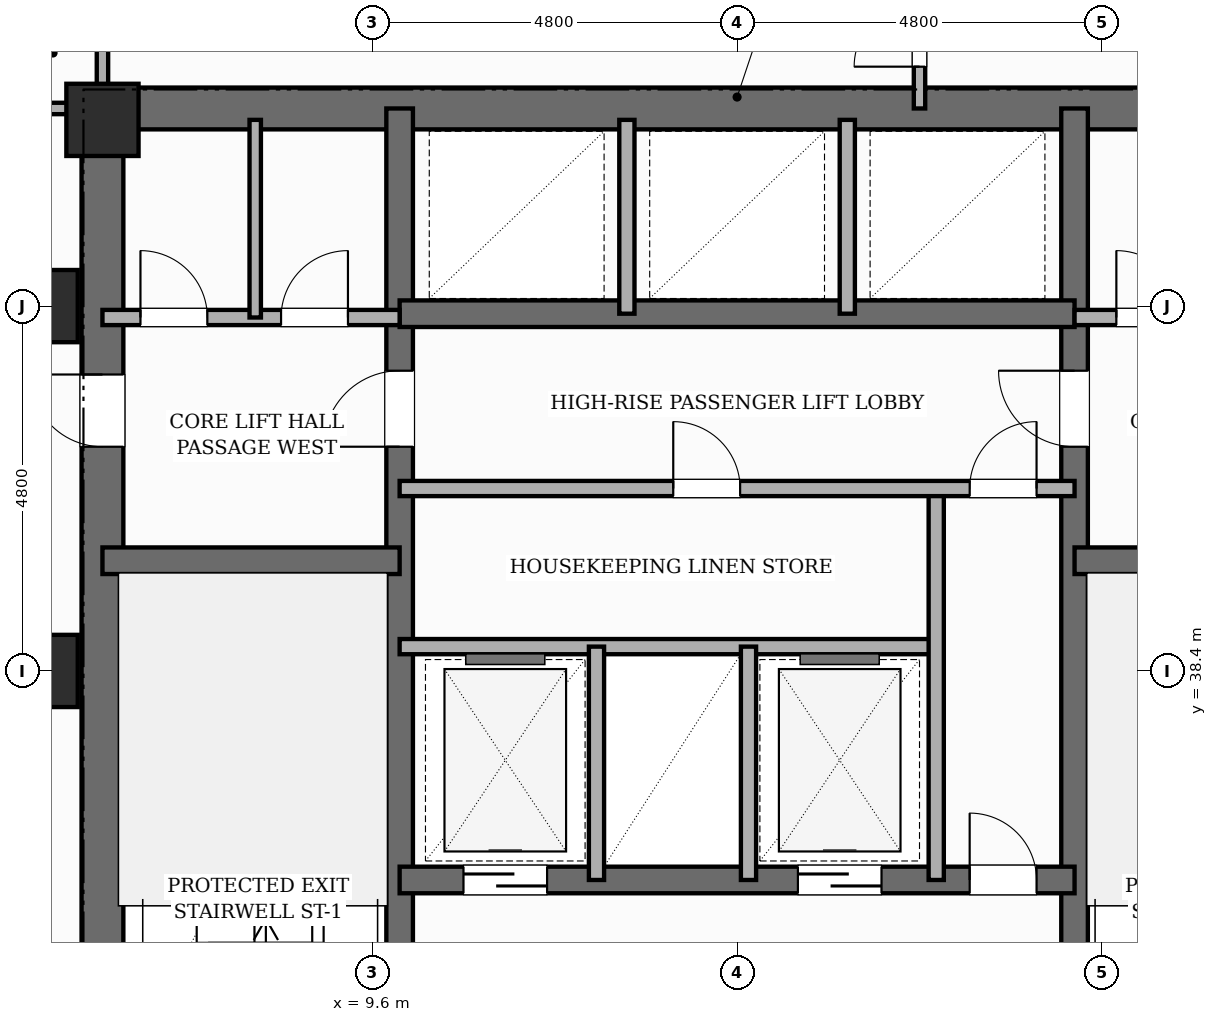
"""IFC4 building model, lengths in metres.
Left out: names, types, materials, properties, quantities, classifications, styles, units other than length and angle.
Written with IfcOpenShell. Run it as: python <this file> out.ifc"""

import sys

from ifc_helpers import new_model, si_unit, direction, frame, frame_2d, origin, origin_2d, place, context, subcontext, project, spatial, rectangle, extrude, element, fill, save


model = new_model("IFC4")
c1 = context("Model", 3, precision=1e-05, world=origin(), true_north=direction((0.0, 1.0)))
c2 = subcontext(c1, "Body", "Model", "MODEL_VIEW")
j1 = project(units=[si_unit("LENGTHUNIT", "METRE"), si_unit("PLANEANGLEUNIT", "RADIAN")], contexts=[c1])
p1 = place(None, origin())
s1 = spatial("IfcSite", under=j1, at=p1, CompositionType="ELEMENT")
p2 = place(p1, origin())
s2 = spatial("IfcBuilding", under=s1, at=p2, CompositionType="ELEMENT")
p3 = place(p2, frame((0.0, 0.0, 107.2)))
s3 = spatial("IfcBuildingStorey", under=s2, at=p3, CompositionType="ELEMENT", Elevation=107.2)
p4 = place(p3, frame((6.05, 30.625, 0.0), z_axis=(0.0, 0.0, 1.0), x_axis=(0.0, 1.0, 0.0)))
e1 = element("IfcWall", 1, at=p4, inside=s3, PredefinedType="SHEAR", context=c2, shape_type="SweptSolid", body=[
    extrude(rectangle(XDim=15.45, YDim=0.55, at=frame_2d((7.725, 0.0))), origin(), (0.0, 0.0, 1.0), 3.6),
])
p5 = place(p4, frame((10.725, 0.0, 0.0)))
e2 = element("IfcOpeningElement", 2, at=p5, cuts=e1, PredefinedType="OPENING", context=c2, shape_type="SweptSolid", body=[
    extrude(rectangle(XDim=0.95, YDim=2.15, at=frame_2d((0.475, 1.075))), frame((0.0, 0.285, 0.0), z_axis=(0.0, -1.0, 0.0), x_axis=(1.0, 0.0, 0.0)), (0.0, 0.0, 1.0), 0.57),
])
p6 = place(p3, frame((6.05, 45.8, 0.0), z_axis=(0.0, 0.0, 1.0), x_axis=(1.0, 0.0, 0.0)))
e3 = element("IfcWall", 3, at=p6, inside=s3, PredefinedType="SHEAR", context=c2, shape_type="SweptSolid", body=[
    extrude(rectangle(XDim=16.7, YDim=0.55, at=frame_2d((8.35, 0.0))), origin(), (0.0, 0.0, 1.0), 3.6),
])
p7 = place(p3, frame((9.96, 30.9, 0.0), z_axis=(0.0, 0.0, 1.0), x_axis=(0.0, 1.0, 0.0)))
e4 = element("IfcWall", 4, at=p7, inside=s3, PredefinedType="SHEAR", context=c2, shape_type="SweptSolid", body=[
    extrude(rectangle(XDim=14.9, YDim=0.35, at=frame_2d((7.45, 0.0))), origin(), (0.0, 0.0, 1.0), 3.6),
])
p8 = place(p7, frame((0.65, 0.0, 0.0)))
e5 = element("IfcOpeningElement", 5, at=p8, cuts=e4, PredefinedType="OPENING", context=c2, shape_type="SweptSolid", body=[
    extrude(rectangle(XDim=0.95, YDim=2.1, at=frame_2d((0.475, 1.05))), frame((0.0, 0.185, 0.0), z_axis=(0.0, -1.0, 0.0), x_axis=(1.0, 0.0, 0.0)), (0.0, 0.0, 1.0), 0.37),
])
p9 = place(p7, frame((10.45, 0.0, 0.0)))
e6 = element("IfcOpeningElement", 6, at=p9, cuts=e4, PredefinedType="OPENING", context=c2, shape_type="SweptSolid", body=[
    extrude(rectangle(XDim=1.0, YDim=2.15, at=frame_2d((0.5, 1.075))), frame((0.0, 0.185, 0.0), z_axis=(0.0, -1.0, 0.0), x_axis=(1.0, 0.0, 0.0)), (0.0, 0.0, 1.0), 0.37),
])
p10 = place(p3, frame((18.84, 30.9, 0.0), z_axis=(0.0, 0.0, 1.0), x_axis=(0.0, 1.0, 0.0)))
e7 = element("IfcWall", 7, at=p10, inside=s3, PredefinedType="SHEAR", context=c2, shape_type="SweptSolid", body=[
    extrude(rectangle(XDim=14.9, YDim=0.35, at=frame_2d((7.45, 0.0))), origin(), (0.0, 0.0, 1.0), 3.6),
])
p11 = place(p10, frame((0.65, 0.0, 0.0)))
e8 = element("IfcOpeningElement", 8, at=p11, cuts=e7, PredefinedType="OPENING", context=c2, shape_type="SweptSolid", body=[
    extrude(rectangle(XDim=0.95, YDim=2.1, at=frame_2d((0.475, 1.05))), frame((0.0, 0.185, 0.0), z_axis=(0.0, -1.0, 0.0), x_axis=(1.0, 0.0, 0.0)), (0.0, 0.0, 1.0), 0.37),
])
p12 = place(p10, frame((10.45, 0.0, 0.0)))
e9 = element("IfcOpeningElement", 9, at=p12, cuts=e7, PredefinedType="OPENING", context=c2, shape_type="SweptSolid", body=[
    extrude(rectangle(XDim=1.0, YDim=2.15, at=frame_2d((0.5, 1.075))), frame((0.0, 0.185, 0.0), z_axis=(0.0, -1.0, 0.0), x_axis=(1.0, 0.0, 0.0)), (0.0, 0.0, 1.0), 0.37),
])
for number, where, z_axis, x_axis in (
    (10, (6.05, 39.85, 0.0), (0.0, 0.0, 1.0), (1.0, 0.0, 0.0)),
    (11, (18.84, 39.85, 0.0), (0.0, 0.0, 1.0), (1.0, 0.0, 0.0)),
):
    element("IfcWall", number, at=place(p3, frame(where, z_axis=z_axis, x_axis=x_axis)), inside=s3, PredefinedType="SHEAR", context=c2, shape_type="SweptSolid", body=[
        extrude(rectangle(XDim=3.91, YDim=0.35, at=frame_2d((1.955, 0.0))), origin(), (0.0, 0.0, 1.0), 3.6),
    ])
p13 = place(p3, frame((9.96, 35.65, 0.0), z_axis=(0.0, 0.0, 1.0), x_axis=(1.0, 0.0, 0.0)))
e12 = element("IfcWall", 12, at=p13, inside=s3, PredefinedType="SHEAR", context=c2, shape_type="SweptSolid", body=[
    extrude(rectangle(XDim=8.88, YDim=0.35, at=frame_2d((4.44, 0.0))), origin(), (0.0, 0.0, 1.0), 3.6),
])
p14 = place(p13, frame((0.84, 0.0, 0.0)))
e13 = element("IfcOpeningElement", 13, at=p14, cuts=e12, PredefinedType="OPENING", context=c2, shape_type="SweptSolid", body=[
    extrude(rectangle(XDim=1.1, YDim=2.15, at=frame_2d((0.55, 1.075))), frame((0.0, 0.185, 0.0), z_axis=(0.0, -1.0, 0.0), x_axis=(1.0, 0.0, 0.0)), (0.0, 0.0, 1.0), 0.37),
])
p15 = place(p13, frame((5.24, 0.0, 0.0)))
e14 = element("IfcOpeningElement", 14, at=p15, cuts=e12, PredefinedType="OPENING", context=c2, shape_type="SweptSolid", body=[
    extrude(rectangle(XDim=1.1, YDim=2.15, at=frame_2d((0.55, 1.075))), frame((0.0, 0.185, 0.0), z_axis=(0.0, -1.0, 0.0), x_axis=(1.0, 0.0, 0.0)), (0.0, 0.0, 1.0), 0.37),
])
p16 = place(p13, frame((7.5, 0.0, 0.0)))
e15 = element("IfcOpeningElement", 15, at=p16, cuts=e12, PredefinedType="OPENING", context=c2, shape_type="SweptSolid", body=[
    extrude(rectangle(XDim=0.88, YDim=2.1, at=frame_2d((0.44, 1.05))), frame((0.0, 0.185, 0.0), z_axis=(0.0, -1.0, 0.0), x_axis=(1.0, 0.0, 0.0)), (0.0, 0.0, 1.0), 0.37),
])
p17 = place(p3, frame((9.96, 43.1, 0.0), z_axis=(0.0, 0.0, 1.0), x_axis=(1.0, 0.0, 0.0)))
e16 = element("IfcWall", 16, at=p17, inside=s3, PredefinedType="SHEAR", context=c2, shape_type="SweptSolid", body=[
    extrude(rectangle(XDim=8.88, YDim=0.35, at=frame_2d((4.44, 0.0))), origin(), (0.0, 0.0, 1.0), 3.6),
])
for number, where, z_axis, x_axis in (
    (17, (5.25, 38.4, 0.0), (0.0, 0.0, 1.0), (1.0, 0.0, 0.0)),
    (18, (5.25, 43.2, 0.0), (0.0, 0.0, 1.0), (1.0, 0.0, 0.0)),
    (19, (6.05, 45.65, 0.0), (0.0, 0.0, 1.0), (1.0, 0.0, 0.0)),
):
    element("IfcColumn", number, at=place(p3, frame(where, z_axis=z_axis, x_axis=x_axis)), inside=s3, PredefinedType="COLUMN", context=c2, shape_type="SweptSolid", body=[
        extrude(rectangle(XDim=0.95, YDim=0.95, at=origin_2d()), origin(), (0.0, 0.0, 1.0), 3.6),
    ])
p18 = place(p3, frame((5.03, 46.16, 0.0), z_axis=(0.0, 0.0, 1.0), x_axis=(0.382650053678, 0.92389335771, 0.0)))
e20 = element("IfcWall", 20, at=p18, inside=s3, PredefinedType="STANDARD", context=c2, shape_type="SweptSolid", body=[
    extrude(rectangle(XDim=0.626, YDim=0.32, at=frame_2d((0.313, 0.0))), origin(), (0.0, 0.0, 1.0), 3.36),
])
p19 = place(p3, frame((9.96, 38.72, 0.0), z_axis=(0.0, 0.0, 1.0), x_axis=(1.0, 0.0, 0.0)))
e21 = element("IfcWall", 21, at=p19, inside=s3, PredefinedType="POLYGONAL", context=c2, shape_type="SweptSolid", body=[
    extrude(rectangle(XDim=7.06, YDim=0.2, at=frame_2d((3.53, 0.0))), origin(), (0.0, 0.0, 1.0), 3.36),
])
for number, where, z_axis, x_axis in (
    (22, (12.55, 35.65, 0.0), (0.0, 0.0, 1.0), (0.0, 1.0, 0.0)),
    (23, (14.55, 35.65, 0.0), (0.0, 0.0, 1.0), (0.0, 1.0, 0.0)),
):
    element("IfcWall", number, at=place(p3, frame(where, z_axis=z_axis, x_axis=x_axis)), inside=s3, PredefinedType="POLYGONAL", context=c2, shape_type="SweptSolid", body=[
        extrude(rectangle(XDim=3.07, YDim=0.2, at=frame_2d((1.535, 0.0))), origin(), (0.0, 0.0, 1.0), 3.36),
    ])
p20 = place(p3, frame((17.02, 35.65, 0.0), z_axis=(0.0, 0.0, 1.0), x_axis=(0.0, 1.0, 0.0)))
e24 = element("IfcWall", 24, at=p20, inside=s3, PredefinedType="POLYGONAL", context=c2, shape_type="SweptSolid", body=[
    extrude(rectangle(XDim=5.15, YDim=0.2, at=frame_2d((2.575, 0.0))), origin(), (0.0, 0.0, 1.0), 3.36),
])
p21 = place(p3, frame((9.96, 40.8, 0.0), z_axis=(0.0, 0.0, 1.0), x_axis=(1.0, 0.0, 0.0)))
e25 = element("IfcWall", 25, at=p21, inside=s3, PredefinedType="POLYGONAL", context=c2, shape_type="SweptSolid", body=[
    extrude(rectangle(XDim=8.88, YDim=0.2, at=frame_2d((4.44, 0.0))), origin(), (0.0, 0.0, 1.0), 3.36),
])
p22 = place(p21, frame((7.5, 0.0, 0.0)))
e26 = element("IfcOpeningElement", 26, at=p22, cuts=e25, PredefinedType="OPENING", context=c2, shape_type="SweptSolid", body=[
    extrude(rectangle(XDim=0.88, YDim=2.1, at=frame_2d((0.44, 1.05))), frame((0.0, 0.11, 0.0), z_axis=(0.0, -1.0, 0.0), x_axis=(1.0, 0.0, 0.0)), (0.0, 0.0, 1.0), 0.22),
])
p23 = place(p21, frame((3.6, 0.0, 0.0)))
e27 = element("IfcOpeningElement", 27, at=p23, cuts=e25, PredefinedType="OPENING", context=c2, shape_type="SweptSolid", body=[
    extrude(rectangle(XDim=0.88, YDim=2.1, at=frame_2d((0.44, 1.05))), frame((0.0, 0.11, 0.0), z_axis=(0.0, -1.0, 0.0), x_axis=(1.0, 0.0, 0.0)), (0.0, 0.0, 1.0), 0.22),
])
p24 = place(p3, frame((18.84, 43.05, 0.0), z_axis=(0.0, 0.0, 1.0), x_axis=(1.0, 0.0, 0.0)))
e28 = element("IfcWall", 28, at=p24, inside=s3, PredefinedType="POLYGONAL", context=c2, shape_type="SweptSolid", body=[
    extrude(rectangle(XDim=3.91, YDim=0.2, at=frame_2d((1.955, 0.0))), origin(), (0.0, 0.0, 1.0), 2.54),
])
p25 = place(p24, frame((0.55, 0.0, 0.0)))
e29 = element("IfcOpeningElement", 29, at=p25, cuts=e28, PredefinedType="OPENING", context=c2, shape_type="SweptSolid", body=[
    extrude(rectangle(XDim=0.88, YDim=2.1, at=frame_2d((0.44, 1.05))), frame((0.0, 0.11, 0.0), z_axis=(0.0, -1.0, 0.0), x_axis=(1.0, 0.0, 0.0)), (0.0, 0.0, 1.0), 0.22),
])
p26 = place(p24, frame((2.25, 0.0, 0.0)))
e30 = element("IfcOpeningElement", 30, at=p26, cuts=e28, PredefinedType="OPENING", context=c2, shape_type="SweptSolid", body=[
    extrude(rectangle(XDim=0.86, YDim=2.1, at=frame_2d((0.43, 1.05))), frame((0.0, 0.11, 0.0), z_axis=(0.0, -1.0, 0.0), x_axis=(1.0, 0.0, 0.0)), (0.0, 0.0, 1.0), 0.22),
])
p27 = place(p3, frame((6.05, 43.05, 0.0), z_axis=(0.0, 0.0, 1.0), x_axis=(1.0, 0.0, 0.0)))
e31 = element("IfcWall", 31, at=p27, inside=s3, PredefinedType="POLYGONAL", context=c2, shape_type="SweptSolid", body=[
    extrude(rectangle(XDim=3.91, YDim=0.2, at=frame_2d((1.955, 0.0))), origin(), (0.0, 0.0, 1.0), 2.54),
])
p28 = place(p27, frame((0.5, 0.0, 0.0)))
e32 = element("IfcOpeningElement", 32, at=p28, cuts=e31, PredefinedType="OPENING", context=c2, shape_type="SweptSolid", body=[
    extrude(rectangle(XDim=0.88, YDim=2.1, at=frame_2d((0.44, 1.05))), frame((0.0, 0.11, 0.0), z_axis=(0.0, -1.0, 0.0), x_axis=(1.0, 0.0, 0.0)), (0.0, 0.0, 1.0), 0.22),
])
p29 = place(p27, frame((2.35, 0.0, 0.0)))
e33 = element("IfcOpeningElement", 33, at=p29, cuts=e31, PredefinedType="OPENING", context=c2, shape_type="SweptSolid", body=[
    extrude(rectangle(XDim=0.88, YDim=2.1, at=frame_2d((0.44, 1.05))), frame((0.0, 0.11, 0.0), z_axis=(0.0, -1.0, 0.0), x_axis=(1.0, 0.0, 0.0)), (0.0, 0.0, 1.0), 0.22),
])
for number, where, z_axis, x_axis in (
    (34, (12.95, 43.1, 0.0), (0.0, 0.0, 1.0), (0.0, 1.0, 0.0)),
    (35, (15.85, 43.1, 0.0), (0.0, 0.0, 1.0), (0.0, 1.0, 0.0)),
):
    element("IfcWall", number, at=place(p3, frame(where, z_axis=z_axis, x_axis=x_axis)), inside=s3, PredefinedType="POLYGONAL", context=c2, shape_type="SweptSolid", body=[
        extrude(rectangle(XDim=2.55, YDim=0.2, at=frame_2d((1.275, 0.0))), origin(), (0.0, 0.0, 1.0), 3.36),
    ])
p30 = place(p3, frame((8.06, 43.05, 0.0), z_axis=(0.0, 0.0, 1.0), x_axis=(0.0, 1.0, 0.0)))
e36 = element("IfcWall", 36, at=p30, inside=s3, PredefinedType="PARTITIONING", context=c2, shape_type="SweptSolid", body=[
    extrude(rectangle(XDim=2.6, YDim=0.15, at=frame_2d((1.3, 0.0))), origin(), (0.0, 0.0, 1.0), 3.36),
])
p31 = place(p3, frame((5.16, 45.8, 0.0), z_axis=(0.0, 0.0, 1.0), x_axis=(1.0, 0.0, 0.0)))
e37 = element("IfcWall", 37, at=p31, inside=s3, PredefinedType="PARTITIONING", context=c2, shape_type="SweptSolid", body=[
    extrude(rectangle(XDim=0.89, YDim=0.15, at=frame_2d((0.445, 0.0))), origin(), (0.0, 0.0, 1.0), 3.36),
])
p32 = place(p3, frame((6.05, 45.8, 0.0), z_axis=(0.0, 0.0, 1.0), x_axis=(0.0, 1.0, 0.0)))
e38 = element("IfcWall", 38, at=p32, inside=s3, PredefinedType="PARTITIONING", context=c2, shape_type="SweptSolid", body=[
    extrude(rectangle(XDim=1.46, YDim=0.15, at=frame_2d((0.73, 0.0))), origin(), (0.0, 0.0, 1.0), 3.36),
])
p33 = place(p3, frame((16.8, 45.8, 0.0), z_axis=(0.0, 0.0, 1.0), x_axis=(0.0, 1.0, 0.0)))
e39 = element("IfcWall", 39, at=p33, inside=s3, PredefinedType="PARTITIONING", context=c2, shape_type="SweptSolid", body=[
    extrude(rectangle(XDim=1.88, YDim=0.15, at=frame_2d((0.94, 0.0))), origin(), (0.0, 0.0, 1.0), 3.36),
])
p34 = place(p33, frame((0.55, 0.0, 0.0)))
e40 = element("IfcOpeningElement", 40, at=p34, cuts=e39, PredefinedType="OPENING", context=c2, shape_type="SweptSolid", body=[
    extrude(rectangle(XDim=0.86, YDim=2.1, at=frame_2d((0.43, 1.05))), frame((0.0, 0.085, 0.0), z_axis=(0.0, -1.0, 0.0), x_axis=(1.0, 0.0, 0.0)), (0.0, 0.0, 1.0), 0.17),
])
p35 = place(p14, origin())
e41 = element("IfcDoor", 41, at=p35, inside=s3, OperationType="SLIDING_TO_LEFT", PredefinedType="DOOR", context=c2, shape_type="SweptSolid", body=[
    extrude(rectangle(XDim=1.1, YDim=2.15, at=frame_2d((0.55, 1.075))), frame((0.0, 0.025, 0.0), z_axis=(0.0, -1.0, 0.0), x_axis=(1.0, 0.0, 0.0)), (0.0, 0.0, 1.0), 0.05),
])
fill(e13, e41)
p36 = place(p15, origin())
e42 = element("IfcDoor", 42, at=p36, inside=s3, OperationType="SLIDING_TO_RIGHT", PredefinedType="DOOR", context=c2, shape_type="SweptSolid", body=[
    extrude(rectangle(XDim=1.1, YDim=2.15, at=frame_2d((0.55, 1.075))), frame((0.0, 0.025, 0.0), z_axis=(0.0, -1.0, 0.0), x_axis=(1.0, 0.0, 0.0)), (0.0, 0.0, 1.0), 0.05),
])
fill(e14, e42)
p37 = place(p16, origin())
e43 = element("IfcDoor", 43, at=p37, inside=s3, OperationType="SINGLE_SWING_LEFT", PredefinedType="DOOR", context=c2, shape_type="SweptSolid", body=[
    extrude(rectangle(XDim=0.88, YDim=2.1, at=frame_2d((0.44, 1.05))), frame((0.0, 0.025, 0.0), z_axis=(0.0, -1.0, 0.0), x_axis=(1.0, 0.0, 0.0)), (0.0, 0.0, 1.0), 0.05),
])
fill(e15, e43)
p38 = place(p22, origin())
e44 = element("IfcDoor", 44, at=p38, inside=s3, OperationType="SINGLE_SWING_RIGHT", PredefinedType="DOOR", context=c2, shape_type="SweptSolid", body=[
    extrude(rectangle(XDim=0.88, YDim=2.1, at=frame_2d((0.44, 1.05))), frame((0.0, 0.025, 0.0), z_axis=(0.0, -1.0, 0.0), x_axis=(1.0, 0.0, 0.0)), (0.0, 0.0, 1.0), 0.05),
])
fill(e26, e44)
p39 = place(p9, origin())
e45 = element("IfcDoor", 45, at=p39, inside=s3, OperationType="SINGLE_SWING_LEFT", PredefinedType="DOOR", context=c2, shape_type="SweptSolid", body=[
    extrude(rectangle(XDim=1.0, YDim=2.15, at=frame_2d((0.5, 1.075))), frame((0.0, 0.025, 0.0), z_axis=(0.0, -1.0, 0.0), x_axis=(1.0, 0.0, 0.0)), (0.0, 0.0, 1.0), 0.05),
])
fill(e6, e45)
p40 = place(p12, origin())
e46 = element("IfcDoor", 46, at=p40, inside=s3, OperationType="SINGLE_SWING_RIGHT", PredefinedType="DOOR", context=c2, shape_type="SweptSolid", body=[
    extrude(rectangle(XDim=1.0, YDim=2.15, at=frame_2d((0.5, 1.075))), frame((0.0, 0.025, 0.0), z_axis=(0.0, -1.0, 0.0), x_axis=(1.0, 0.0, 0.0)), (0.0, 0.0, 1.0), 0.05),
])
fill(e9, e46)
p41 = place(p5, origin())
e47 = element("IfcDoor", 47, at=p41, inside=s3, OperationType="SINGLE_SWING_RIGHT", PredefinedType="DOOR", context=c2, shape_type="SweptSolid", body=[
    extrude(rectangle(XDim=0.95, YDim=2.15, at=frame_2d((0.475, 1.075))), frame((0.0, 0.025, 0.0), z_axis=(0.0, -1.0, 0.0), x_axis=(1.0, 0.0, 0.0)), (0.0, 0.0, 1.0), 0.05),
])
fill(e2, e47)
p42 = place(p28, origin())
e48 = element("IfcDoor", 48, at=p42, inside=s3, OperationType="SINGLE_SWING_LEFT", PredefinedType="DOOR", context=c2, shape_type="SweptSolid", body=[
    extrude(rectangle(XDim=0.88, YDim=2.1, at=frame_2d((0.44, 1.05))), frame((0.0, 0.025, 0.0), z_axis=(0.0, -1.0, 0.0), x_axis=(1.0, 0.0, 0.0)), (0.0, 0.0, 1.0), 0.05),
])
fill(e32, e48)
p43 = place(p29, origin())
e49 = element("IfcDoor", 49, at=p43, inside=s3, OperationType="SINGLE_SWING_RIGHT", PredefinedType="DOOR", context=c2, shape_type="SweptSolid", body=[
    extrude(rectangle(XDim=0.88, YDim=2.1, at=frame_2d((0.44, 1.05))), frame((0.0, 0.025, 0.0), z_axis=(0.0, -1.0, 0.0), x_axis=(1.0, 0.0, 0.0)), (0.0, 0.0, 1.0), 0.05),
])
fill(e33, e49)
p44 = place(p23, origin())
e50 = element("IfcDoor", 50, at=p44, inside=s3, OperationType="SINGLE_SWING_LEFT", PredefinedType="DOOR", context=c2, shape_type="SweptSolid", body=[
    extrude(rectangle(XDim=0.88, YDim=2.1, at=frame_2d((0.44, 1.05))), frame((0.0, 0.025, 0.0), z_axis=(0.0, -1.0, 0.0), x_axis=(1.0, 0.0, 0.0)), (0.0, 0.0, 1.0), 0.05),
])
fill(e27, e50)
p45 = place(p25, origin())
e51 = element("IfcDoor", 51, at=p45, inside=s3, OperationType="SINGLE_SWING_LEFT", PredefinedType="DOOR", context=c2, shape_type="SweptSolid", body=[
    extrude(rectangle(XDim=0.88, YDim=2.1, at=frame_2d((0.44, 1.05))), frame((0.0, 0.025, 0.0), z_axis=(0.0, -1.0, 0.0), x_axis=(1.0, 0.0, 0.0)), (0.0, 0.0, 1.0), 0.05),
])
fill(e29, e51)
p46 = place(p34, origin())
e52 = element("IfcDoor", 52, at=p46, inside=s3, OperationType="SINGLE_SWING_LEFT", PredefinedType="DOOR", context=c2, shape_type="SweptSolid", body=[
    extrude(rectangle(XDim=0.86, YDim=2.1, at=frame_2d((0.43, 1.05))), frame((0.0, 0.025, 0.0), z_axis=(0.0, -1.0, 0.0), x_axis=(1.0, 0.0, 0.0)), (0.0, 0.0, 1.0), 0.05),
])
fill(e40, e52)
save(model, sys.argv[1])
